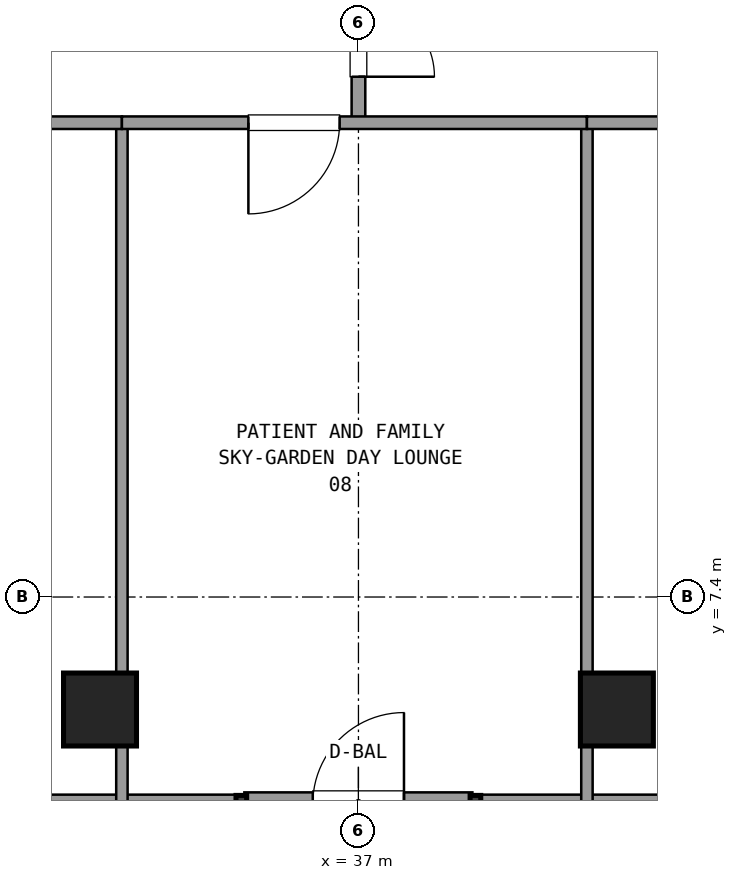
"""IFC4 building model, lengths in metres.
Left out: names, types, materials, properties, quantities, classifications, styles, units other than length and angle.
Written with IfcOpenShell. Run it as: python <this file> out.ifc"""

import sys

from ifc_helpers import new_model, si_unit, direction, frame, frame_2d, origin, origin_2d, place, context, subcontext, project, spatial, rectangle, extrude, element, fill, save


model = new_model("IFC4")
c1 = context("Model", 3, precision=1e-05, world=origin(), true_north=direction((0.0, 1.0)))
c2 = subcontext(c1, "Body", "Model", "MODEL_VIEW")
j1 = project(units=[si_unit("LENGTHUNIT", "METRE"), si_unit("PLANEANGLEUNIT", "RADIAN")], contexts=[c1])
p1 = place(None, origin())
s1 = spatial("IfcSite", under=j1, at=p1, CompositionType="ELEMENT")
p2 = place(p1, origin())
s2 = spatial("IfcBuilding", under=s1, at=p2, CompositionType="ELEMENT")
p3 = place(p2, frame((0.0, 0.0, 152.82)))
s3 = spatial("IfcBuildingStorey", under=s2, at=p3, CompositionType="ELEMENT", Elevation=152.82)
for number, where, z_axis, x_axis in (
    (1, (33.6, 5.92, 0.0), (0.0, 0.0, 1.0), (1.0, 0.0, 0.0)),
    (2, (40.4, 5.92, 0.0), (0.0, 0.0, 1.0), (1.0, 0.0, 0.0)),
):
    element("IfcColumn", number, at=place(p3, frame(where, z_axis=z_axis, x_axis=x_axis)), inside=s3, PredefinedType="COLUMN", context=c2, shape_type="SweptSolid", body=[
        extrude(rectangle(XDim=0.96, YDim=0.96, at=origin_2d()), origin(), (0.0, 0.0, 1.0), 3.6),
    ])
p4 = place(p3, frame((35.499, 4.68, 0.0), z_axis=(0.0, 0.0, 1.0), x_axis=(1.0, 0.0, 0.0)))
e3 = element("IfcWall", 3, at=p4, inside=s3, PredefinedType="SOLIDWALL", context=c2, shape_type="SweptSolid", body=[
    extrude(rectangle(XDim=3.0, YDim=0.3, at=frame_2d((1.5, 0.0))), origin(), (0.0, 0.0, 1.0), 2.67),
])
p5 = place(p4, frame((0.9, 0.0, 0.0)))
e4 = element("IfcOpeningElement", 4, at=p5, cuts=e3, PredefinedType="OPENING", context=c2, shape_type="SweptSolid", body=[
    extrude(rectangle(XDim=1.2, YDim=2.2, at=frame_2d((0.6, 1.1))), frame((0.0, 0.16, 0.0), z_axis=(0.0, -1.0, 0.0), x_axis=(1.0, 0.0, 0.0)), (0.0, 0.0, 1.0), 0.32),
])
p6 = place(p3, frame((19.671, 4.68, 0.0), z_axis=(0.0, 0.0, 1.0), x_axis=(1.0, 0.0, 0.0)))
e5 = element("IfcWall", 5, at=p6, inside=s3, PredefinedType="SOLIDWALL", context=c2, shape_type="SweptSolid", body=[
    extrude(rectangle(XDim=15.788, YDim=0.24, at=frame_2d((7.894, 0.0))), origin(), (0.0, 0.0, 1.0), 0.85),
])
p7 = place(p3, frame((38.539, 4.68, 0.0), z_axis=(0.0, 0.0, 1.0), x_axis=(1.0, 0.0, 0.0)))
e6 = element("IfcWall", 6, at=p7, inside=s3, PredefinedType="SOLIDWALL", context=c2, shape_type="SweptSolid", body=[
    extrude(rectangle(XDim=15.79, YDim=0.24, at=frame_2d((7.895, 0.0))), origin(), (0.0, 0.0, 1.0), 0.85),
])
p8 = place(p3, frame((37.0, 13.64, 0.0), z_axis=(0.0, 0.0, 1.0), x_axis=(0.0, 1.0, 0.0)))
e7 = element("IfcWall", 7, at=p8, inside=s3, PredefinedType="PARTITIONING", context=c2, shape_type="SweptSolid", body=[
    extrude(rectangle(XDim=3.21, YDim=0.18, at=frame_2d((1.605, 0.0))), origin(), (0.0, 0.0, 1.0), 2.61),
])
p9 = place(p8, frame((0.605, 0.0, 0.0)))
e8 = element("IfcOpeningElement", 8, at=p9, cuts=e7, PredefinedType="OPENING", context=c2, shape_type="SweptSolid", body=[
    extrude(rectangle(XDim=2.0, YDim=2.2, at=frame_2d((1.0, 1.1))), frame((0.0, 0.1, 0.0), z_axis=(0.0, -1.0, 0.0), x_axis=(1.0, 0.0, 0.0)), (0.0, 0.0, 1.0), 0.2),
])
p10 = place(p3, frame((33.888, 13.64, 0.0), z_axis=(0.0, 0.0, 1.0), x_axis=(0.0, -1.0, 0.0)))
e9 = element("IfcWall", 9, at=p10, inside=s3, PredefinedType="PARTITIONING", context=c2, shape_type="SweptSolid", body=[
    extrude(rectangle(XDim=8.94, YDim=0.15, at=frame_2d((4.47, 0.0))), origin(), (0.0, 0.0, 1.0), 2.61),
])
p11 = place(p3, frame((25.43, 13.64, 0.0), z_axis=(0.0, 0.0, 1.0), x_axis=(1.0, 0.0, 0.0)))
e10 = element("IfcWall", 10, at=p11, inside=s3, PredefinedType="PARTITIONING", context=c2, shape_type="SweptSolid", body=[
    extrude(rectangle(XDim=8.458, YDim=0.165, at=frame_2d((4.229, 0.0))), origin(), (0.0, 0.0, 1.0), 2.61),
])
p12 = place(p11, frame((3.629, 0.0, 0.0)))
e11 = element("IfcOpeningElement", 11, at=p12, cuts=e10, PredefinedType="OPENING", context=c2, shape_type="SweptSolid", body=[
    extrude(rectangle(XDim=1.2, YDim=2.15, at=frame_2d((0.6, 1.075))), frame((0.0, 0.093, 0.0), z_axis=(0.0, -1.0, 0.0), x_axis=(1.0, 0.0, 0.0)), (0.0, 0.0, 1.0), 0.185),
])
p13 = place(p3, frame((40.006, 13.64, 0.0), z_axis=(0.0, 0.0, 1.0), x_axis=(0.0, -1.0, 0.0)))
e12 = element("IfcWall", 12, at=p13, inside=s3, PredefinedType="PARTITIONING", context=c2, shape_type="SweptSolid", body=[
    extrude(rectangle(XDim=8.94, YDim=0.15, at=frame_2d((4.47, 0.0))), origin(), (0.0, 0.0, 1.0), 2.61),
])
p14 = place(p3, frame((33.888, 13.64, 0.0), z_axis=(0.0, 0.0, 1.0), x_axis=(1.0, 0.0, 0.0)))
e13 = element("IfcWall", 13, at=p14, inside=s3, PredefinedType="PARTITIONING", context=c2, shape_type="SweptSolid", body=[
    extrude(rectangle(XDim=6.118, YDim=0.165, at=frame_2d((3.059, 0.0))), origin(), (0.0, 0.0, 1.0), 2.61),
])
p15 = place(p14, frame((1.664, 0.0, 0.0)))
e14 = element("IfcOpeningElement", 14, at=p15, cuts=e13, PredefinedType="OPENING", context=c2, shape_type="SweptSolid", body=[
    extrude(rectangle(XDim=1.2, YDim=2.15, at=frame_2d((0.6, 1.075))), frame((0.0, 0.093, 0.0), z_axis=(0.0, -1.0, 0.0), x_axis=(1.0, 0.0, 0.0)), (0.0, 0.0, 1.0), 0.185),
])
p16 = place(p3, frame((40.006, 13.64, 0.0), z_axis=(0.0, 0.0, 1.0), x_axis=(1.0, 0.0, 0.0)))
e15 = element("IfcWall", 15, at=p16, inside=s3, PredefinedType="PARTITIONING", context=c2, shape_type="SweptSolid", body=[
    extrude(rectangle(XDim=8.564, YDim=0.165, at=frame_2d((4.282, 0.0))), origin(), (0.0, 0.0, 1.0), 2.61),
])
p17 = place(p16, frame((3.682, 0.0, 0.0)))
e16 = element("IfcOpeningElement", 16, at=p17, cuts=e15, PredefinedType="OPENING", context=c2, shape_type="SweptSolid", body=[
    extrude(rectangle(XDim=1.2, YDim=2.15, at=frame_2d((0.6, 1.075))), frame((0.0, 0.093, 0.0), z_axis=(0.0, -1.0, 0.0), x_axis=(1.0, 0.0, 0.0)), (0.0, 0.0, 1.0), 0.185),
])
p18 = place(p9, frame((2.0, 0.0, 0.0), z_axis=(0.0, 0.0, 1.0), x_axis=(-1.0, 0.0, 0.0)))
e17 = element("IfcDoor", 17, at=p18, inside=s3, OperationType="DOUBLE_DOOR_SINGLE_SWING", PredefinedType="DOOR", context=c2, shape_type="SweptSolid", body=[
    extrude(rectangle(XDim=2.0, YDim=2.2, at=frame_2d((1.0, 1.1))), frame((0.0, 0.025, 0.0), z_axis=(0.0, -1.0, 0.0), x_axis=(1.0, 0.0, 0.0)), (0.0, 0.0, 1.0), 0.05),
])
fill(e8, e17)
p19 = place(p15, frame((1.2, 0.0, 0.0), z_axis=(0.0, 0.0, 1.0), x_axis=(-1.0, 0.0, 0.0)))
e18 = element("IfcDoor", 18, at=p19, inside=s3, OperationType="SINGLE_SWING_LEFT", PredefinedType="DOOR", context=c2, shape_type="SweptSolid", body=[
    extrude(rectangle(XDim=1.2, YDim=2.15, at=frame_2d((0.6, 1.075))), frame((0.0, 0.025, 0.0), z_axis=(0.0, -1.0, 0.0), x_axis=(1.0, 0.0, 0.0)), (0.0, 0.0, 1.0), 0.05),
])
fill(e14, e18)
save(model, sys.argv[1])
